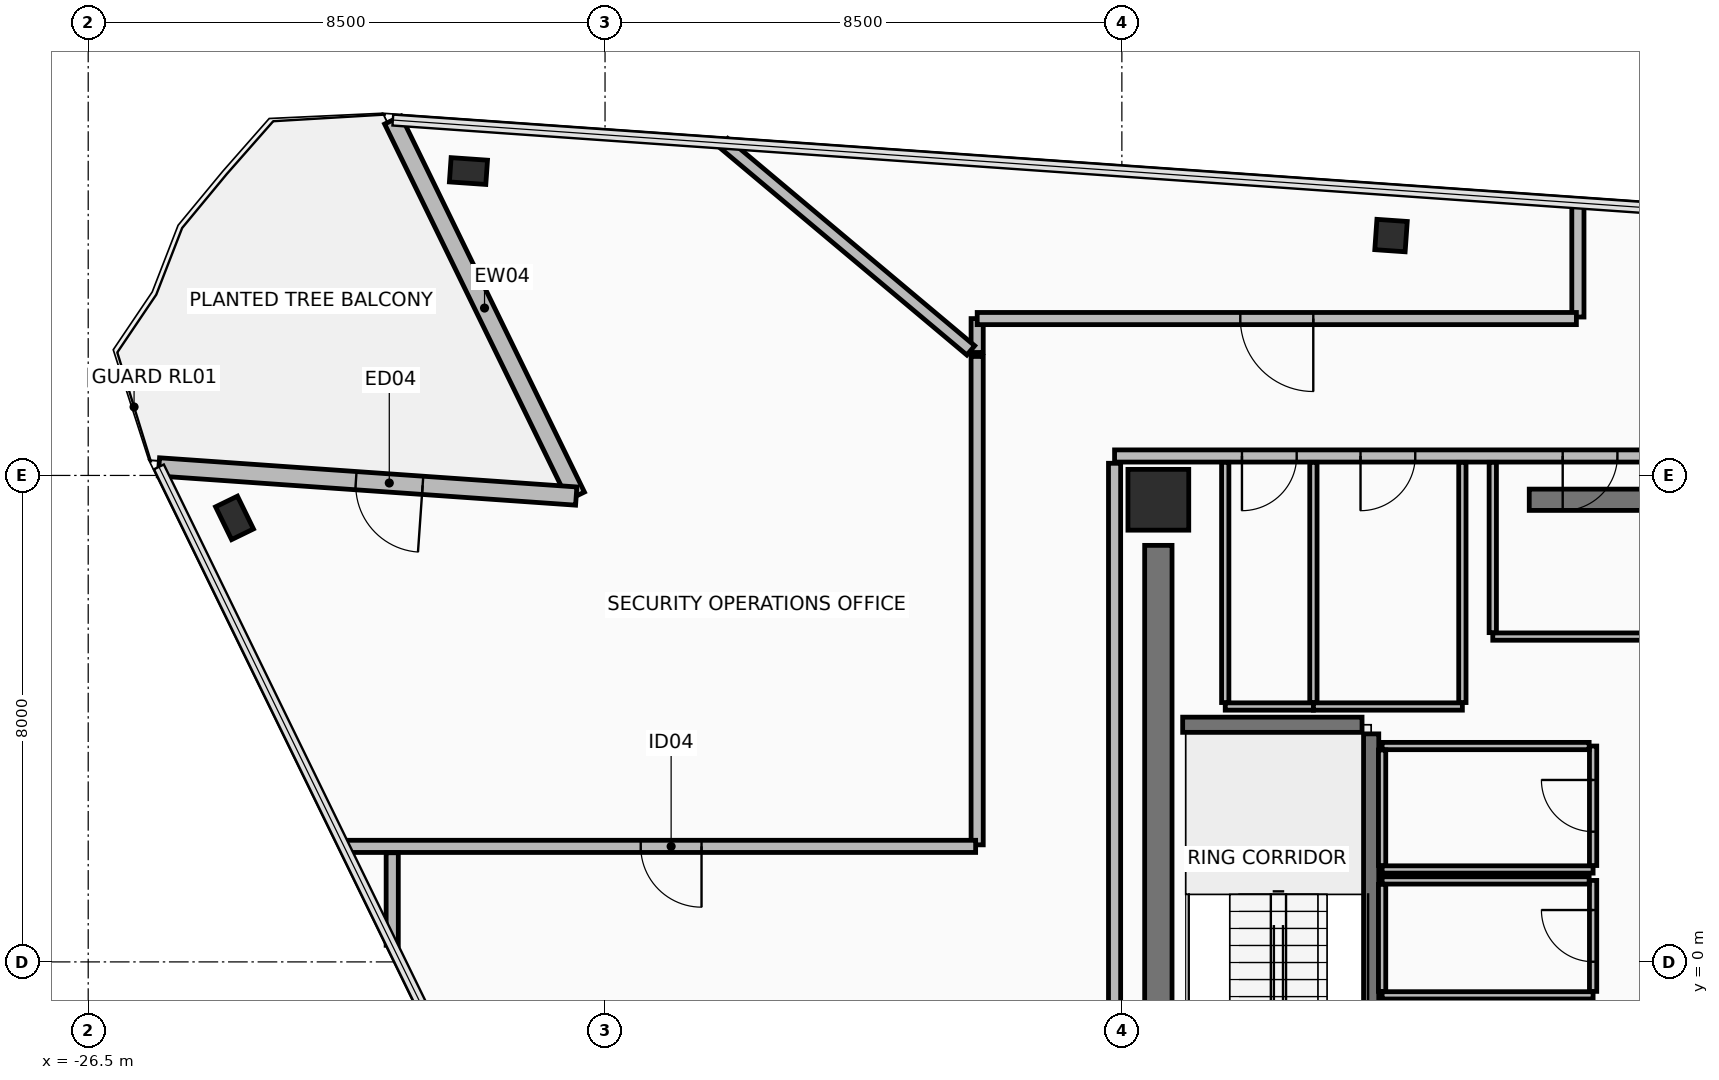
"""IFC4 building model, lengths in metres.
Left out: names, types, materials, properties, quantities, classifications, styles, units other than length and angle.
Written with IfcOpenShell. Run it as: python <this file> out.ifc"""

import sys

from ifc_helpers import new_model, si_unit, direction, frame, frame_2d, origin, origin_2d, place, context, subcontext, project, spatial, rectangle, hollow_rectangle, extrude, element, fill, save


model = new_model("IFC4")
c1 = context("Model", 3, precision=1e-05, world=origin(), true_north=direction((0.0, 1.0)))
c2 = subcontext(c1, "Body", "Model", "MODEL_VIEW")
j1 = project(units=[si_unit("LENGTHUNIT", "METRE"), si_unit("PLANEANGLEUNIT", "RADIAN")], contexts=[c1])
p1 = place(None, origin())
s1 = spatial("IfcSite", under=j1, at=p1, CompositionType="ELEMENT")
p2 = place(p1, origin())
s2 = spatial("IfcBuilding", under=s1, at=p2, CompositionType="ELEMENT")
p3 = place(p2, frame((0.0, 0.0, 248.65)))
s3 = spatial("IfcBuildingStorey", under=s2, at=p3, CompositionType="ELEMENT", Elevation=248.65)
p4 = place(p3, frame((-8.9, 7.6, 0.0), z_axis=(0.0, 0.0, 1.0), x_axis=(1.0, 0.0, 0.0)))
e1 = element("IfcColumn", 1, at=p4, inside=s3, PredefinedType="COLUMN", context=c2, shape_type="SweptSolid", body=[
    extrude(rectangle(XDim=1.0, YDim=1.0, at=origin_2d()), origin(), (0.0, 0.0, 1.0), 4.75),
])
p5 = place(p3, frame((-24.094, 7.302, 0.0), z_axis=(0.0, 0.0, 1.0), x_axis=(-0.438371146789, 0.898794046299, 0.0)))
e2 = element("IfcColumn", 2, at=p5, inside=s3, PredefinedType="COLUMN", context=c2, shape_type="SweptSolid", body=[
    extrude(hollow_rectangle(XDim=0.4, YDim=0.6, WallThickness=0.03, at=origin_2d()), origin(), (0.0, 0.0, 1.0), 4.75),
])
p6 = place(p3, frame((-5.073, 11.945, 0.0), z_axis=(0.0, 0.0, 1.0), x_axis=(-0.99756405026, 0.069756473744, 0.0)))
e3 = element("IfcColumn", 3, at=p6, inside=s3, PredefinedType="COLUMN", context=c2, shape_type="SweptSolid", body=[
    extrude(hollow_rectangle(XDim=0.5, YDim=0.5, WallThickness=0.032, at=origin_2d()), origin(), (0.0, 0.0, 1.0), 4.75),
])
p7 = place(p3, frame((-20.246, 13.006, 0.0), z_axis=(0.0, 0.0, 1.0), x_axis=(-0.99756405026, 0.069756473744, 0.0)))
e4 = element("IfcColumn", 4, at=p7, inside=s3, PredefinedType="COLUMN", context=c2, shape_type="SweptSolid", body=[
    extrude(hollow_rectangle(XDim=0.4, YDim=0.6, WallThickness=0.03, at=origin_2d()), origin(), (0.0, 0.0, 1.0), 4.75),
])
p8 = place(p3, frame((-21.49, 13.844, 0.0), z_axis=(0.0, 0.0, 1.0), x_axis=(0.438391471143, -0.898784133165, 0.0)))
e5 = element("IfcWall", 5, at=p8, inside=s3, PredefinedType="STANDARD", context=c2, shape_type="SweptSolid", body=[
    extrude(rectangle(XDim=6.88, YDim=0.3, at=frame_2d((3.44, 0.0))), origin(), (0.0, 0.0, 1.0), 2.255),
])
p9 = place(p3, frame((-18.474, 7.661, 0.0), z_axis=(0.0, 0.0, 1.0), x_axis=(-0.997565982203, 0.069728840176, 0.0)))
e6 = element("IfcWall", 6, at=p9, inside=s3, PredefinedType="STANDARD", context=c2, shape_type="SweptSolid", body=[
    extrude(rectangle(XDim=6.88, YDim=0.3, at=frame_2d((3.44, 0.0))), origin(), (0.0, 0.0, 1.0), 2.255),
])
p10 = place(p9, frame((2.532, 0.0, 0.0)))
e7 = element("IfcOpeningElement", 7, at=p10, cuts=e6, PredefinedType="OPENING", context=c2, shape_type="SweptSolid", body=[
    extrude(rectangle(XDim=1.1, YDim=2.2, at=frame_2d((0.55, 1.1))), frame((0.0, 0.16, 0.0), z_axis=(0.0, -1.0, 0.0), x_axis=(1.0, 0.0, 0.0)), (0.0, 0.0, 1.0), 0.32),
])
p11 = place(p3, frame((-2.8, 7.6, 0.0), z_axis=(0.0, 0.0, 1.0), x_axis=(1.0, 0.0, 0.0)))
e8 = element("IfcWall", 8, at=p11, inside=s3, PredefinedType="SHEAR", context=c2, shape_type="SweptSolid", body=[
    extrude(rectangle(XDim=5.38, YDim=0.35, at=frame_2d((2.69, 0.0))), origin(), (0.0, 0.0, 1.0), 4.56),
])
p12 = place(p3, frame((-8.9, -3.85, 0.0), z_axis=(0.0, 0.0, 1.0), x_axis=(0.0, 1.0, 0.0)))
e9 = element("IfcWall", 9, at=p12, inside=s3, PredefinedType="SHEAR", context=c2, shape_type="SweptSolid", body=[
    extrude(rectangle(XDim=10.7, YDim=0.45, at=frame_2d((5.35, 0.0))), origin(), (0.0, 0.0, 1.0), 4.56),
])
p13 = place(p3, frame((9.62, 8.32, 0.0), z_axis=(0.0, 0.0, 1.0), x_axis=(-1.0, 0.0, 0.0)))
e10 = element("IfcWall", 10, at=p13, inside=s3, PredefinedType="PARTITIONING", context=c2, shape_type="SweptSolid", body=[
    extrude(rectangle(XDim=19.24, YDim=0.2, at=frame_2d((9.62, 0.0))), origin(), (0.0, 0.0, 1.0), 2.755),
])
p14 = place(p13, frame((10.97, 0.0, 0.0)))
e11 = element("IfcOpeningElement", 11, at=p14, cuts=e10, PredefinedType="OPENING", context=c2, shape_type="SweptSolid", body=[
    extrude(rectangle(XDim=0.9, YDim=2.1, at=frame_2d((0.45, 1.05))), frame((0.0, 0.11, 0.0), z_axis=(0.0, -1.0, 0.0), x_axis=(1.0, 0.0, 0.0)), (0.0, 0.0, 1.0), 0.22),
])
p15 = place(p13, frame((7.57, 0.0, 0.0)))
e12 = element("IfcOpeningElement", 12, at=p15, cuts=e10, PredefinedType="OPENING", context=c2, shape_type="SweptSolid", body=[
    extrude(rectangle(XDim=0.9, YDim=2.1, at=frame_2d((0.45, 1.05))), frame((0.0, 0.11, 0.0), z_axis=(0.0, -1.0, 0.0), x_axis=(1.0, 0.0, 0.0)), (0.0, 0.0, 1.0), 0.22),
])
p16 = place(p13, frame((16.245, 0.0, 0.0)))
e13 = element("IfcOpeningElement", 13, at=p16, cuts=e10, PredefinedType="OPENING", context=c2, shape_type="SweptSolid", body=[
    extrude(rectangle(XDim=0.9, YDim=2.1, at=frame_2d((0.45, 1.05))), frame((0.0, 0.11, 0.0), z_axis=(0.0, -1.0, 0.0), x_axis=(1.0, 0.0, 0.0)), (0.0, 0.0, 1.0), 0.22),
])
p17 = place(p13, frame((14.295, 0.0, 0.0)))
e14 = element("IfcOpeningElement", 14, at=p17, cuts=e10, PredefinedType="OPENING", context=c2, shape_type="SweptSolid", body=[
    extrude(rectangle(XDim=0.9, YDim=2.1, at=frame_2d((0.45, 1.05))), frame((0.0, 0.11, 0.0), z_axis=(0.0, -1.0, 0.0), x_axis=(1.0, 0.0, 0.0)), (0.0, 0.0, 1.0), 0.22),
])
p18 = place(p3, frame((-9.62, 8.2, 0.0), z_axis=(0.0, 0.0, 1.0), x_axis=(0.0, -1.0, 0.0)))
e15 = element("IfcWall", 15, at=p18, inside=s3, PredefinedType="PARTITIONING", context=c2, shape_type="SweptSolid", body=[
    extrude(rectangle(XDim=16.4, YDim=0.2, at=frame_2d((8.2, 0.0))), origin(), (0.0, 0.0, 1.0), 2.355),
])
p19 = place(p18, frame((12.65, 0.0, 0.0)))
e16 = element("IfcOpeningElement", 16, at=p19, cuts=e15, PredefinedType="OPENING", context=c2, shape_type="SweptSolid", body=[
    extrude(rectangle(XDim=1.1, YDim=2.15, at=frame_2d((0.55, 1.075))), frame((0.0, 0.11, 0.0), z_axis=(0.0, -1.0, 0.0), x_axis=(1.0, 0.0, 0.0)), (0.0, 0.0, 1.0), 0.22),
])
p20 = place(p3, frame((-5.4, -3.55, 0.0), z_axis=(0.0, 0.0, 1.0), x_axis=(0.0, 1.0, 0.0)))
e17 = element("IfcWall", 17, at=p20, inside=s3, PredefinedType="SHEAR", context=c2, shape_type="SweptSolid", body=[
    extrude(rectangle(XDim=7.3, YDim=0.25, at=frame_2d((3.65, 0.0))), origin(), (0.0, 0.0, 1.0), 4.56),
])
p21 = place(p3, frame((-8.5, 3.9, 0.0), z_axis=(0.0, 0.0, 1.0), x_axis=(1.0, 0.0, 0.0)))
e18 = element("IfcWall", 18, at=p21, inside=s3, PredefinedType="SHEAR", context=c2, shape_type="SweptSolid", body=[
    extrude(rectangle(XDim=2.95, YDim=0.25, at=frame_2d((1.475, 0.0))), origin(), (0.0, 0.0, 1.0), 4.56),
])
p22 = place(p3, frame((-5.22, 1.52, 0.0), z_axis=(0.0, 0.0, 1.0), x_axis=(1.0, 0.0, 0.0)))
e19 = element("IfcWall", 19, at=p22, inside=s3, PredefinedType="PARTITIONING", context=c2, shape_type="SweptSolid", body=[
    extrude(rectangle(XDim=3.47, YDim=0.12, at=frame_2d((1.735, 0.0))), origin(), (0.0, 0.0, 1.0), 4.56),
])
p23 = place(p3, frame((-1.75, 1.585, 0.0), z_axis=(0.0, 0.0, 1.0), x_axis=(0.0, 1.0, 0.0)))
e20 = element("IfcWall", 20, at=p23, inside=s3, PredefinedType="PARTITIONING", context=c2, shape_type="SweptSolid", body=[
    extrude(rectangle(XDim=1.965, YDim=0.12, at=frame_2d((0.982, 0.0))), origin(), (0.0, 0.0, 1.0), 4.56),
])
p24 = place(p23, frame((0.557, 0.0, 0.0)))
e21 = element("IfcOpeningElement", 21, at=p24, cuts=e20, PredefinedType="OPENING", context=c2, shape_type="SweptSolid", body=[
    extrude(rectangle(XDim=0.85, YDim=2.1, at=frame_2d((0.425, 1.05))), frame((0.0, 0.07, 0.0), z_axis=(0.0, -1.0, 0.0), x_axis=(1.0, 0.0, 0.0)), (0.0, 0.0, 1.0), 0.14),
])
p25 = place(p3, frame((-1.815, 3.55, 0.0), z_axis=(0.0, 0.0, 1.0), x_axis=(-1.0, 0.0, 0.0)))
e22 = element("IfcWall", 22, at=p25, inside=s3, PredefinedType="PARTITIONING", context=c2, shape_type="SweptSolid", body=[
    extrude(rectangle(XDim=3.405, YDim=0.12, at=frame_2d((1.703, 0.0))), origin(), (0.0, 0.0, 1.0), 4.56),
])
p26 = place(p3, frame((-5.22, 3.485, 0.0), z_axis=(0.0, 0.0, 1.0), x_axis=(0.0, -1.0, 0.0)))
e23 = element("IfcWall", 23, at=p26, inside=s3, PredefinedType="PARTITIONING", context=c2, shape_type="SweptSolid", body=[
    extrude(rectangle(XDim=1.9, YDim=0.12, at=frame_2d((0.95, 0.0))), origin(), (0.0, 0.0, 1.0), 4.56),
])
p27 = place(p3, frame((-5.22, -0.55, 0.0), z_axis=(0.0, 0.0, 1.0), x_axis=(1.0, 0.0, 0.0)))
e24 = element("IfcWall", 24, at=p27, inside=s3, PredefinedType="PARTITIONING", context=c2, shape_type="SweptSolid", body=[
    extrude(rectangle(XDim=3.47, YDim=0.12, at=frame_2d((1.735, 0.0))), origin(), (0.0, 0.0, 1.0), 4.56),
])
p28 = place(p3, frame((-1.75, -0.485, 0.0), z_axis=(0.0, 0.0, 1.0), x_axis=(0.0, 1.0, 0.0)))
e25 = element("IfcWall", 25, at=p28, inside=s3, PredefinedType="PARTITIONING", context=c2, shape_type="SweptSolid", body=[
    extrude(rectangle(XDim=1.825, YDim=0.12, at=frame_2d((0.913, 0.0))), origin(), (0.0, 0.0, 1.0), 4.56),
])
p29 = place(p28, frame((0.488, 0.0, 0.0)))
e26 = element("IfcOpeningElement", 26, at=p29, cuts=e25, PredefinedType="OPENING", context=c2, shape_type="SweptSolid", body=[
    extrude(rectangle(XDim=0.85, YDim=2.1, at=frame_2d((0.425, 1.05))), frame((0.0, 0.07, 0.0), z_axis=(0.0, -1.0, 0.0), x_axis=(1.0, 0.0, 0.0)), (0.0, 0.0, 1.0), 0.14),
])
p30 = place(p3, frame((-1.815, 1.34, 0.0), z_axis=(0.0, 0.0, 1.0), x_axis=(-1.0, 0.0, 0.0)))
e27 = element("IfcWall", 27, at=p30, inside=s3, PredefinedType="PARTITIONING", context=c2, shape_type="SweptSolid", body=[
    extrude(rectangle(XDim=3.405, YDim=0.12, at=frame_2d((1.703, 0.0))), origin(), (0.0, 0.0, 1.0), 4.56),
])
p31 = place(p3, frame((-5.22, 1.275, 0.0), z_axis=(0.0, 0.0, 1.0), x_axis=(0.0, -1.0, 0.0)))
e28 = element("IfcWall", 28, at=p31, inside=s3, PredefinedType="PARTITIONING", context=c2, shape_type="SweptSolid", body=[
    extrude(rectangle(XDim=1.76, YDim=0.12, at=frame_2d((0.88, 0.0))), origin(), (0.0, 0.0, 1.0), 4.56),
])
p32 = place(p3, frame((-3.4, 5.35, 0.0), z_axis=(0.0, 0.0, 1.0), x_axis=(1.0, 0.0, 0.0)))
e29 = element("IfcWall", 29, at=p32, inside=s3, PredefinedType="PARTITIONING", context=c2, shape_type="SweptSolid", body=[
    extrude(rectangle(XDim=3.2, YDim=0.12, at=frame_2d((1.6, 0.0))), origin(), (0.0, 0.0, 1.0), 4.56),
])
p33 = place(p3, frame((-3.4, 8.215, 0.0), z_axis=(0.0, 0.0, 1.0), x_axis=(0.0, -1.0, 0.0)))
e30 = element("IfcWall", 30, at=p33, inside=s3, PredefinedType="PARTITIONING", context=c2, shape_type="SweptSolid", body=[
    extrude(rectangle(XDim=2.8, YDim=0.12, at=frame_2d((1.4, 0.0))), origin(), (0.0, 0.0, 1.0), 3.855),
])
p34 = place(p3, frame((-7.8, 4.2, 0.0), z_axis=(0.0, 0.0, 1.0), x_axis=(1.0, 0.0, 0.0)))
e31 = element("IfcWall", 31, at=p34, inside=s3, PredefinedType="PARTITIONING", context=c2, shape_type="SweptSolid", body=[
    extrude(rectangle(XDim=1.45, YDim=0.12, at=frame_2d((0.725, 0.0))), origin(), (0.0, 0.0, 1.0), 4.56),
])
for number, where, z_axis, x_axis in (
    (32, (-6.35, 4.265, 0.0), (0.0, 0.0, 1.0), (0.0, 1.0, 0.0)),
    (33, (-7.8, 8.215, 0.0), (0.0, 0.0, 1.0), (0.0, -1.0, 0.0)),
):
    element("IfcWall", number, at=place(p3, frame(where, z_axis=z_axis, x_axis=x_axis)), inside=s3, PredefinedType="PARTITIONING", context=c2, shape_type="SweptSolid", body=[
        extrude(rectangle(XDim=3.95, YDim=0.12, at=frame_2d((1.975, 0.0))), origin(), (0.0, 0.0, 1.0), 3.855),
    ])
p35 = place(p3, frame((-6.35, 4.2, 0.0), z_axis=(0.0, 0.0, 1.0), x_axis=(1.0, 0.0, 0.0)))
e34 = element("IfcWall", 34, at=p35, inside=s3, PredefinedType="PARTITIONING", context=c2, shape_type="SweptSolid", body=[
    extrude(rectangle(XDim=2.45, YDim=0.12, at=frame_2d((1.225, 0.0))), origin(), (0.0, 0.0, 1.0), 4.56),
])
p36 = place(p3, frame((-3.9, 4.265, 0.0), z_axis=(0.0, 0.0, 1.0), x_axis=(0.0, 1.0, 0.0)))
e35 = element("IfcWall", 35, at=p36, inside=s3, PredefinedType="PARTITIONING", context=c2, shape_type="SweptSolid", body=[
    extrude(rectangle(XDim=3.95, YDim=0.12, at=frame_2d((1.975, 0.0))), origin(), (0.0, 0.0, 1.0), 3.855),
])
p37 = place(p3, frame((-11.88, 10.579, 0.0), z_axis=(0.0, 0.0, 1.0), x_axis=(0.0, -1.0, 0.0)))
e36 = element("IfcWall", 36, at=p37, inside=s3, PredefinedType="PARTITIONING", context=c2, shape_type="SweptSolid", body=[
    extrude(rectangle(XDim=0.557, YDim=0.2, at=frame_2d((0.279, 0.0))), origin(), (0.0, 0.0, 1.0), 2.755),
])
p38 = place(p3, frame((-11.985, 10.057, 0.0), z_axis=(0.0, 0.0, 1.0), x_axis=(-0.766042290072, 0.64279017558, 0.0)))
e37 = element("IfcWall", 37, at=p38, inside=s3, PredefinedType="PARTITIONING", context=c2, shape_type="SweptSolid", body=[
    extrude(rectangle(XDim=5.301, YDim=0.2, at=frame_2d((2.65, 0.0))), origin(), (0.0, 0.0, 1.0), 2.255),
])
p39 = place(p3, frame((-2.0, 12.482, 0.0), z_axis=(0.0, 0.0, 1.0), x_axis=(0.0, -1.0, 0.0)))
e38 = element("IfcWall", 38, at=p39, inside=s3, PredefinedType="PARTITIONING", context=c2, shape_type="SweptSolid", body=[
    extrude(rectangle(XDim=1.877, YDim=0.2, at=frame_2d((0.938, 0.0))), origin(), (0.0, 0.0, 1.0), 2.255),
])
p40 = place(p3, frame((-2.025, 10.58, 0.0), z_axis=(0.0, 0.0, 1.0), x_axis=(-1.0, 0.0, 0.0)))
e39 = element("IfcWall", 39, at=p40, inside=s3, PredefinedType="PARTITIONING", context=c2, shape_type="SweptSolid", body=[
    extrude(rectangle(XDim=9.854, YDim=0.2, at=frame_2d((4.927, 0.0))), origin(), (0.0, 0.0, 1.0), 2.755),
])
p41 = place(p40, frame((4.327, 0.0, 0.0)))
e40 = element("IfcOpeningElement", 40, at=p41, cuts=e39, PredefinedType="OPENING", context=c2, shape_type="SweptSolid", body=[
    extrude(rectangle(XDim=1.2, YDim=2.15, at=frame_2d((0.6, 1.075))), frame((0.0, 0.11, 0.0), z_axis=(0.0, -1.0, 0.0), x_axis=(1.0, 0.0, 0.0)), (0.0, 0.0, 1.0), 0.22),
])
p42 = place(p3, frame((-11.88, 9.957, 0.0), z_axis=(0.0, 0.0, 1.0), x_axis=(0.0, -1.0, 0.0)))
e41 = element("IfcWall", 41, at=p42, inside=s3, PredefinedType="PARTITIONING", context=c2, shape_type="SweptSolid", body=[
    extrude(rectangle(XDim=8.032, YDim=0.2, at=frame_2d((4.016, 0.0))), origin(), (0.0, 0.0, 1.0), 2.355),
])
p43 = place(p3, frame((-11.905, 1.9, 0.0), z_axis=(0.0, 0.0, 1.0), x_axis=(-1.0, 0.0, 0.0)))
e42 = element("IfcWall", 42, at=p43, inside=s3, PredefinedType="PARTITIONING", context=c2, shape_type="SweptSolid", body=[
    extrude(rectangle(XDim=10.388, YDim=0.2, at=frame_2d((5.194, 0.0))), origin(), (0.0, 0.0, 1.0), 2.255),
])
p44 = place(p43, frame((4.508, 0.0, 0.0)))
e43 = element("IfcOpeningElement", 43, at=p44, cuts=e42, PredefinedType="OPENING", context=c2, shape_type="SweptSolid", body=[
    extrude(rectangle(XDim=1.0, YDim=2.15, at=frame_2d((0.5, 1.075))), frame((0.0, 0.11, 0.0), z_axis=(0.0, -1.0, 0.0), x_axis=(1.0, 0.0, 0.0)), (0.0, 0.0, 1.0), 0.22),
])
p45 = place(p3, frame((-21.5, 1.795, 0.0), z_axis=(0.0, 0.0, 1.0), x_axis=(0.0, -1.0, 0.0)))
e44 = element("IfcWall", 44, at=p45, inside=s3, PredefinedType="PARTITIONING", context=c2, shape_type="SweptSolid", body=[
    extrude(rectangle(XDim=1.521, YDim=0.2, at=frame_2d((0.761, 0.0))), origin(), (0.0, 0.0, 1.0), 2.255),
])
p46 = place(p10, origin())
e45 = element("IfcDoor", 45, at=p46, inside=s3, OperationType="SINGLE_SWING_LEFT", PredefinedType="DOOR", context=c2, shape_type="SweptSolid", body=[
    extrude(rectangle(XDim=1.1, YDim=2.2, at=frame_2d((0.55, 1.1))), frame((0.0, 0.025, 0.0), z_axis=(0.0, -1.0, 0.0), x_axis=(1.0, 0.0, 0.0)), (0.0, 0.0, 1.0), 0.05),
])
fill(e7, e45)
p47 = place(p24, frame((0.85, 0.0, 0.0), z_axis=(0.0, 0.0, 1.0), x_axis=(-1.0, 0.0, 0.0)))
e46 = element("IfcDoor", 46, at=p47, inside=s3, OperationType="SINGLE_SWING_RIGHT", PredefinedType="DOOR", context=c2, shape_type="SweptSolid", body=[
    extrude(rectangle(XDim=0.85, YDim=2.1, at=frame_2d((0.425, 1.05))), frame((0.0, 0.025, 0.0), z_axis=(0.0, -1.0, 0.0), x_axis=(1.0, 0.0, 0.0)), (0.0, 0.0, 1.0), 0.05),
])
fill(e21, e46)
p48 = place(p29, frame((0.85, 0.0, 0.0), z_axis=(0.0, 0.0, 1.0), x_axis=(-1.0, 0.0, 0.0)))
e47 = element("IfcDoor", 47, at=p48, inside=s3, OperationType="SINGLE_SWING_RIGHT", PredefinedType="DOOR", context=c2, shape_type="SweptSolid", body=[
    extrude(rectangle(XDim=0.85, YDim=2.1, at=frame_2d((0.425, 1.05))), frame((0.0, 0.025, 0.0), z_axis=(0.0, -1.0, 0.0), x_axis=(1.0, 0.0, 0.0)), (0.0, 0.0, 1.0), 0.05),
])
fill(e26, e47)
p49 = place(p14, frame((0.9, 0.0, 0.0), z_axis=(0.0, 0.0, 1.0), x_axis=(-1.0, 0.0, 0.0)))
e48 = element("IfcDoor", 48, at=p49, inside=s3, OperationType="SINGLE_SWING_LEFT", PredefinedType="DOOR", context=c2, shape_type="SweptSolid", body=[
    extrude(rectangle(XDim=0.9, YDim=2.1, at=frame_2d((0.45, 1.05))), frame((0.0, 0.025, 0.0), z_axis=(0.0, -1.0, 0.0), x_axis=(1.0, 0.0, 0.0)), (0.0, 0.0, 1.0), 0.05),
])
fill(e11, e48)
p50 = place(p16, frame((0.9, 0.0, 0.0), z_axis=(0.0, 0.0, 1.0), x_axis=(-1.0, 0.0, 0.0)))
e49 = element("IfcDoor", 49, at=p50, inside=s3, OperationType="SINGLE_SWING_LEFT", PredefinedType="DOOR", context=c2, shape_type="SweptSolid", body=[
    extrude(rectangle(XDim=0.9, YDim=2.1, at=frame_2d((0.45, 1.05))), frame((0.0, 0.025, 0.0), z_axis=(0.0, -1.0, 0.0), x_axis=(1.0, 0.0, 0.0)), (0.0, 0.0, 1.0), 0.05),
])
fill(e13, e49)
p51 = place(p17, frame((0.9, 0.0, 0.0), z_axis=(0.0, 0.0, 1.0), x_axis=(-1.0, 0.0, 0.0)))
e50 = element("IfcDoor", 50, at=p51, inside=s3, OperationType="SINGLE_SWING_LEFT", PredefinedType="DOOR", context=c2, shape_type="SweptSolid", body=[
    extrude(rectangle(XDim=0.9, YDim=2.1, at=frame_2d((0.45, 1.05))), frame((0.0, 0.025, 0.0), z_axis=(0.0, -1.0, 0.0), x_axis=(1.0, 0.0, 0.0)), (0.0, 0.0, 1.0), 0.05),
])
fill(e14, e50)
p52 = place(p41, origin())
e51 = element("IfcDoor", 51, at=p52, inside=s3, OperationType="SINGLE_SWING_LEFT", PredefinedType="DOOR", context=c2, shape_type="SweptSolid", body=[
    extrude(rectangle(XDim=1.2, YDim=2.15, at=frame_2d((0.6, 1.075))), frame((0.0, 0.025, 0.0), z_axis=(0.0, -1.0, 0.0), x_axis=(1.0, 0.0, 0.0)), (0.0, 0.0, 1.0), 0.05),
])
fill(e40, e51)
p53 = place(p44, origin())
e52 = element("IfcDoor", 52, at=p53, inside=s3, OperationType="SINGLE_SWING_RIGHT", PredefinedType="DOOR", context=c2, shape_type="SweptSolid", body=[
    extrude(rectangle(XDim=1.0, YDim=2.15, at=frame_2d((0.5, 1.075))), frame((0.0, 0.025, 0.0), z_axis=(0.0, -1.0, 0.0), x_axis=(1.0, 0.0, 0.0)), (0.0, 0.0, 1.0), 0.05),
])
fill(e43, e52)
save(model, sys.argv[1])
